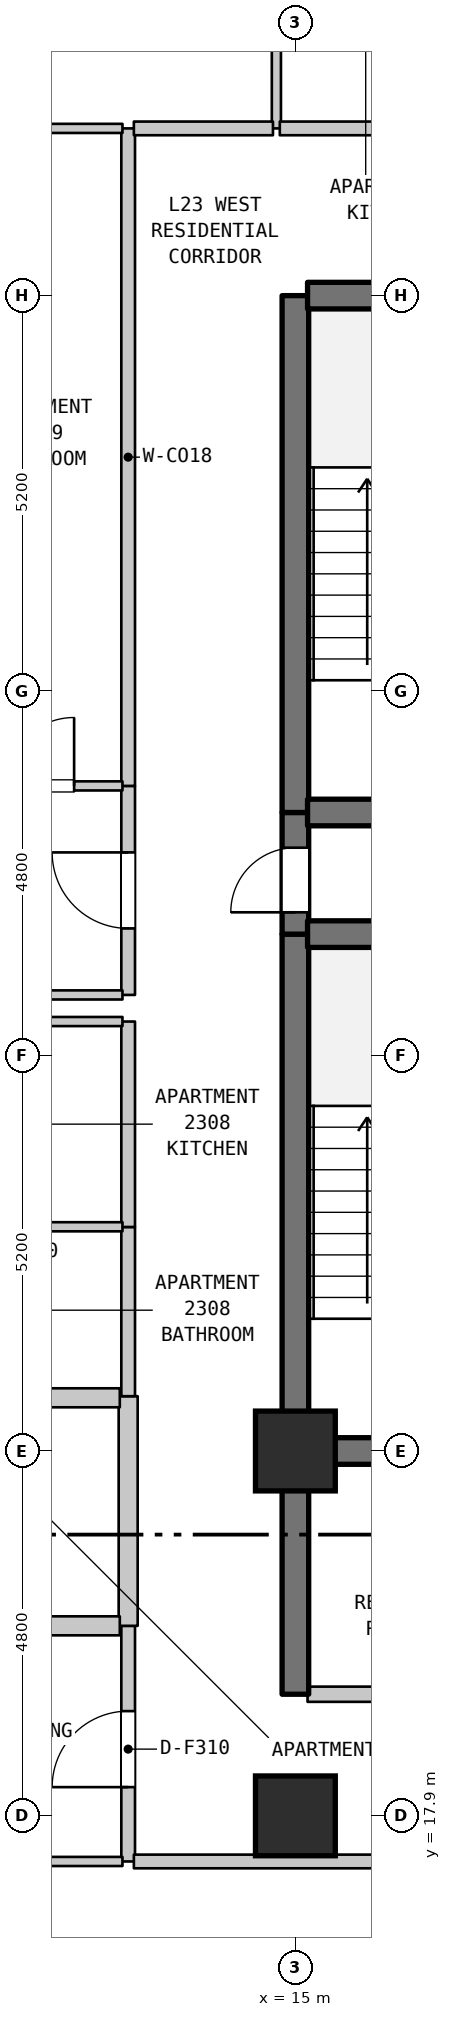
"""IFC4 building model, lengths in metres.
Left out: names, types, materials, properties, quantities, classifications, styles, units other than length and angle.
Written with IfcOpenShell. Run it as: python <this file> out.ifc"""

import sys

from ifc_helpers import new_model, si_unit, direction, frame, frame_2d, origin, origin_2d, place, context, subcontext, project, spatial, rectangle, extrude, element, fill, save


model = new_model("IFC4")
c1 = context("Model", 3, precision=1e-05, world=origin(), true_north=direction((0.0, 1.0)))
c2 = subcontext(c1, "Body", "Model", "MODEL_VIEW")
j1 = project(units=[si_unit("LENGTHUNIT", "METRE"), si_unit("PLANEANGLEUNIT", "RADIAN")], contexts=[c1])
p1 = place(None, origin())
s1 = spatial("IfcSite", under=j1, at=p1, CompositionType="ELEMENT")
p2 = place(p1, origin())
s2 = spatial("IfcBuilding", under=s1, at=p2, CompositionType="ELEMENT")
p3 = place(p2, frame((0.0, 0.0, 98.3)))
s3 = spatial("IfcBuildingStorey", under=s2, at=p3, CompositionType="ELEMENT", Elevation=98.3)
for number, where, z_axis, x_axis in (
    (1, (15.0, 17.9, 0.0), (0.0, 0.0, 1.0), (1.0, 0.0, 0.0)),
    (2, (15.0, 22.7, 0.0), (0.0, 0.0, 1.0), (1.0, 0.0, 0.0)),
):
    element("IfcColumn", number, at=place(p3, frame(where, z_axis=z_axis, x_axis=x_axis)), inside=s3, PredefinedType="COLUMN", context=c2, shape_type="SweptSolid", body=[
        extrude(rectangle(XDim=1.05, YDim=1.05, at=origin_2d()), origin(), (0.0, 0.0, 1.0), 3.7),
    ])
p4 = place(p3, frame((12.8, 17.3, 0.0), z_axis=(0.0, 0.0, 1.0), x_axis=(0.0, 1.0, 0.0)))
e3 = element("IfcWall", 3, at=p4, inside=s3, PredefinedType="STANDARD", context=c2, shape_type="SweptSolid", body=[
    extrude(rectangle(XDim=3.1, YDim=0.18, at=frame_2d((1.55, 0.0))), origin(), (0.0, 0.0, 1.0), 3.385),
])
p5 = place(p4, frame((0.978, 0.0, 0.0)))
e4 = element("IfcOpeningElement", 4, at=p5, cuts=e3, PredefinedType="OPENING", context=c2, shape_type="SweptSolid", body=[
    extrude(rectangle(XDim=1.0, YDim=2.15, at=frame_2d((0.5, 1.075))), frame((0.0, 0.1, 0.0), z_axis=(0.0, -1.0, 0.0), x_axis=(1.0, 0.0, 0.0)), (0.0, 0.0, 1.0), 0.2),
])
p6 = place(p3, frame((12.8, 20.4, 0.0), z_axis=(0.0, 0.0, 1.0), x_axis=(0.0, 1.0, 0.0)))
e5 = element("IfcWall", 5, at=p6, inside=s3, PredefinedType="STANDARD", context=c2, shape_type="SweptSolid", body=[
    extrude(rectangle(XDim=3.021, YDim=0.25, at=frame_2d((1.51, 0.0))), origin(), (0.0, 0.0, 1.0), 3.385),
])
p7 = place(p3, frame((12.8, 23.421, 0.0), z_axis=(0.0, 0.0, 1.0), x_axis=(0.0, 1.0, 0.0)))
e6 = element("IfcWall", 6, at=p7, inside=s3, PredefinedType="STANDARD", context=c2, shape_type="SweptSolid", body=[
    extrude(rectangle(XDim=2.226, YDim=0.18, at=frame_2d((1.113, 0.0))), origin(), (0.0, 0.0, 1.0), 3.385),
])
p8 = place(p3, frame((12.8, 25.647, 0.0), z_axis=(0.0, 0.0, 1.0), x_axis=(0.0, 1.0, 0.0)))
e7 = element("IfcWall", 7, at=p8, inside=s3, PredefinedType="STANDARD", context=c2, shape_type="SweptSolid", body=[
    extrude(rectangle(XDim=2.703, YDim=0.18, at=frame_2d((1.352, 0.0))), origin(), (0.0, 0.0, 1.0), 3.385),
])
p9 = place(p3, frame((12.8, 28.7, 0.0), z_axis=(0.0, 0.0, 1.0), x_axis=(0.0, 1.0, 0.0)))
e8 = element("IfcWall", 8, at=p9, inside=s3, PredefinedType="STANDARD", context=c2, shape_type="SweptSolid", body=[
    extrude(rectangle(XDim=2.75, YDim=0.18, at=frame_2d((1.375, 0.0))), origin(), (0.0, 0.0, 1.0), 3.385),
])
p10 = place(p9, frame((0.875, 0.0, 0.0)))
e9 = element("IfcOpeningElement", 9, at=p10, cuts=e8, PredefinedType="OPENING", context=c2, shape_type="SweptSolid", body=[
    extrude(rectangle(XDim=1.0, YDim=2.15, at=frame_2d((0.5, 1.075))), frame((0.0, 0.1, 0.0), z_axis=(0.0, -1.0, 0.0), x_axis=(1.0, 0.0, 0.0)), (0.0, 0.0, 1.0), 0.2),
])
p11 = place(p3, frame((12.8, 31.45, 0.0), z_axis=(0.0, 0.0, 1.0), x_axis=(0.0, 1.0, 0.0)))
e10 = element("IfcWall", 10, at=p11, inside=s3, PredefinedType="STANDARD", context=c2, shape_type="SweptSolid", body=[
    extrude(rectangle(XDim=8.65, YDim=0.18, at=frame_2d((4.325, 0.0))), origin(), (0.0, 0.0, 1.0), 3.385),
])
p12 = place(p3, frame((14.75, 40.1, 0.0), z_axis=(0.0, 0.0, 1.0), x_axis=(0.0, 1.0, 0.0)))
e11 = element("IfcWall", 11, at=p12, inside=s3, PredefinedType="PARTITIONING", context=c2, shape_type="SweptSolid", body=[
    extrude(rectangle(XDim=3.2, YDim=0.12, at=frame_2d((1.6, 0.0))), origin(), (0.0, 0.0, 1.0), 3.385),
])
p13 = place(p12, frame((1.15, 0.0, 0.0)))
e12 = element("IfcOpeningElement", 12, at=p13, cuts=e11, PredefinedType="OPENING", context=c2, shape_type="SweptSolid", body=[
    extrude(rectangle(XDim=0.9, YDim=2.15, at=frame_2d((0.45, 1.075))), frame((0.0, 0.07, 0.0), z_axis=(0.0, -1.0, 0.0), x_axis=(1.0, 0.0, 0.0)), (0.0, 0.0, 1.0), 0.14),
])
p14 = place(p3, frame((15.0, 19.5, 0.0), z_axis=(0.0, 0.0, 1.0), x_axis=(0.0, 1.0, 0.0)))
e13 = element("IfcWall", 13, at=p14, inside=s3, PredefinedType="SHEAR", context=c2, shape_type="SweptSolid", body=[
    extrude(rectangle(XDim=3.2, YDim=0.35, at=frame_2d((1.6, 0.0))), origin(), (0.0, 0.0, 1.0), 3.385),
])
p15 = place(p3, frame((15.0, 22.7, 0.0), z_axis=(0.0, 0.0, 1.0), x_axis=(0.0, 1.0, 0.0)))
e14 = element("IfcWall", 14, at=p15, inside=s3, PredefinedType="SHEAR", context=c2, shape_type="SweptSolid", body=[
    extrude(rectangle(XDim=6.8, YDim=0.35, at=frame_2d((3.4, 0.0))), origin(), (0.0, 0.0, 1.0), 3.385),
])
p16 = place(p3, frame((15.0, 29.5, 0.0), z_axis=(0.0, 0.0, 1.0), x_axis=(0.0, 1.0, 0.0)))
e15 = element("IfcWall", 15, at=p16, inside=s3, PredefinedType="SHEAR", context=c2, shape_type="SweptSolid", body=[
    extrude(rectangle(XDim=1.6, YDim=0.35, at=frame_2d((0.8, 0.0))), origin(), (0.0, 0.0, 1.0), 3.385),
])
p17 = place(p16, frame((0.287, 0.0, 0.0)))
e16 = element("IfcOpeningElement", 16, at=p17, cuts=e15, PredefinedType="OPENING", context=c2, shape_type="SweptSolid", body=[
    extrude(rectangle(XDim=0.85, YDim=2.1, at=frame_2d((0.425, 1.05))), frame((0.0, 0.185, 0.0), z_axis=(0.0, -1.0, 0.0), x_axis=(1.0, 0.0, 0.0)), (0.0, 0.0, 1.0), 0.37),
])
p18 = place(p3, frame((15.0, 31.1, 0.0), z_axis=(0.0, 0.0, 1.0), x_axis=(0.0, 1.0, 0.0)))
e17 = element("IfcWall", 17, at=p18, inside=s3, PredefinedType="SHEAR", context=c2, shape_type="SweptSolid", body=[
    extrude(rectangle(XDim=6.8, YDim=0.35, at=frame_2d((3.4, 0.0))), origin(), (0.0, 0.0, 1.0), 3.385),
])
p19 = place(p3, frame((9.085, 17.3, 0.0), z_axis=(0.0, 0.0, 1.0), x_axis=(1.0, 0.0, 0.0)))
e18 = element("IfcWall", 18, at=p19, inside=s3, PredefinedType="PARTITIONING", context=c2, shape_type="SweptSolid", body=[
    extrude(rectangle(XDim=3.64, YDim=0.12, at=frame_2d((1.82, 0.0))), origin(), (0.0, 0.0, 1.0), 3.385),
])
p20 = place(p3, frame((12.875, 17.3, 0.0), z_axis=(0.0, 0.0, 1.0), x_axis=(1.0, 0.0, 0.0)))
e19 = element("IfcWall", 19, at=p20, inside=s3, PredefinedType="STANDARD", context=c2, shape_type="SweptSolid", body=[
    extrude(rectangle(XDim=7.35, YDim=0.18, at=frame_2d((3.675, 0.0))), origin(), (0.0, 0.0, 1.0), 3.385),
])
p21 = place(p20, frame((3.16, 0.0, 0.0)))
e20 = element("IfcOpeningElement", 20, at=p21, cuts=e19, PredefinedType="OPENING", context=c2, shape_type="SweptSolid", body=[
    extrude(rectangle(XDim=1.0, YDim=2.15, at=frame_2d((0.5, 1.075))), frame((0.0, 0.1, 0.0), z_axis=(0.0, -1.0, 0.0), x_axis=(1.0, 0.0, 0.0)), (0.0, 0.0, 1.0), 0.2),
])
p22 = place(p3, frame((15.16, 19.5, 0.0), z_axis=(0.0, 0.0, 1.0), x_axis=(1.0, 0.0, 0.0)))
e21 = element("IfcWall", 21, at=p22, inside=s3, PredefinedType="STANDARD", context=c2, shape_type="SweptSolid", body=[
    extrude(rectangle(XDim=3.68, YDim=0.2, at=frame_2d((1.84, 0.0))), origin(), (0.0, 0.0, 1.0), 3.385),
])
p23 = place(p22, frame((1.39, 0.0, 0.0)))
e22 = element("IfcOpeningElement", 22, at=p23, cuts=e21, PredefinedType="OPENING", context=c2, shape_type="SweptSolid", body=[
    extrude(rectangle(XDim=0.9, YDim=2.15, at=frame_2d((0.45, 1.075))), frame((0.0, 0.11, 0.0), z_axis=(0.0, -1.0, 0.0), x_axis=(1.0, 0.0, 0.0)), (0.0, 0.0, 1.0), 0.22),
])
p24 = place(p3, frame((10.66, 20.4, 0.0), z_axis=(0.0, 0.0, 1.0), x_axis=(1.0, 0.0, 0.0)))
e23 = element("IfcWall", 23, at=p24, inside=s3, PredefinedType="STANDARD", context=c2, shape_type="SweptSolid", body=[
    extrude(rectangle(XDim=2.03, YDim=0.25, at=frame_2d((1.015, 0.0))), origin(), (0.0, 0.0, 1.0), 3.385),
])
p25 = place(p3, frame((15.16, 22.7, 0.0), z_axis=(0.0, 0.0, 1.0), x_axis=(1.0, 0.0, 0.0)))
e24 = element("IfcWall", 24, at=p25, inside=s3, PredefinedType="SHEAR", context=c2, shape_type="SweptSolid", body=[
    extrude(rectangle(XDim=3.68, YDim=0.35, at=frame_2d((1.84, 0.0))), origin(), (0.0, 0.0, 1.0), 3.385),
])
p26 = place(p3, frame((10.66, 23.4, 0.0), z_axis=(0.0, 0.0, 1.0), x_axis=(1.0, 0.0, 0.0)))
e25 = element("IfcWall", 25, at=p26, inside=s3, PredefinedType="STANDARD", context=c2, shape_type="SweptSolid", body=[
    extrude(rectangle(XDim=2.03, YDim=0.25, at=frame_2d((1.015, 0.0))), origin(), (0.0, 0.0, 1.0), 3.385),
])
for number, where, z_axis, x_axis in (
    (26, (10.595, 25.65, 0.0), (0.0, 0.0, 1.0), (1.0, 0.0, 0.0)),
    (27, (10.595, 28.35, 0.0), (0.0, 0.0, 1.0), (1.0, 0.0, 0.0)),
):
    element("IfcWall", number, at=place(p3, frame(where, z_axis=z_axis, x_axis=x_axis)), inside=s3, PredefinedType="PARTITIONING", context=c2, shape_type="SweptSolid", body=[
        extrude(rectangle(XDim=2.13, YDim=0.12, at=frame_2d((1.065, 0.0))), origin(), (0.0, 0.0, 1.0), 3.385),
    ])
p27 = place(p3, frame((9.03, 28.7, 0.0), z_axis=(0.0, 0.0, 1.0), x_axis=(1.0, 0.0, 0.0)))
e28 = element("IfcWall", 28, at=p27, inside=s3, PredefinedType="PARTITIONING", context=c2, shape_type="SweptSolid", body=[
    extrude(rectangle(XDim=3.695, YDim=0.12, at=frame_2d((1.848, 0.0))), origin(), (0.0, 0.0, 1.0), 3.385),
])
for number, where, z_axis, x_axis in (
    (29, (15.16, 29.5, 0.0), (0.0, 0.0, 1.0), (1.0, 0.0, 0.0)),
    (30, (15.16, 31.1, 0.0), (0.0, 0.0, 1.0), (1.0, 0.0, 0.0)),
):
    element("IfcWall", number, at=place(p3, frame(where, z_axis=z_axis, x_axis=x_axis)), inside=s3, PredefinedType="SHEAR", context=c2, shape_type="SweptSolid", body=[
        extrude(rectangle(XDim=3.68, YDim=0.35, at=frame_2d((1.84, 0.0))), origin(), (0.0, 0.0, 1.0), 3.385),
    ])
p28 = place(p3, frame((10.523, 31.45, 0.0), z_axis=(0.0, 0.0, 1.0), x_axis=(1.0, 0.0, 0.0)))
e31 = element("IfcWall", 31, at=p28, inside=s3, PredefinedType="PARTITIONING", context=c2, shape_type="SweptSolid", body=[
    extrude(rectangle(XDim=2.202, YDim=0.12, at=frame_2d((1.101, 0.0))), origin(), (0.0, 0.0, 1.0), 3.385),
])
p29 = place(p28, frame((0.666, 0.0, 0.0)))
e32 = element("IfcOpeningElement", 32, at=p29, cuts=e31, PredefinedType="OPENING", context=c2, shape_type="SweptSolid", body=[
    extrude(rectangle(XDim=0.9, YDim=2.1, at=frame_2d((0.45, 1.05))), frame((0.0, 0.07, 0.0), z_axis=(0.0, -1.0, 0.0), x_axis=(1.0, 0.0, 0.0)), (0.0, 0.0, 1.0), 0.14),
])
p30 = place(p3, frame((15.16, 37.9, 0.0), z_axis=(0.0, 0.0, 1.0), x_axis=(1.0, 0.0, 0.0)))
e33 = element("IfcWall", 33, at=p30, inside=s3, PredefinedType="SHEAR", context=c2, shape_type="SweptSolid", body=[
    extrude(rectangle(XDim=3.68, YDim=0.35, at=frame_2d((1.84, 0.0))), origin(), (0.0, 0.0, 1.0), 3.385),
])
p31 = place(p3, frame((10.523, 40.1, 0.0), z_axis=(0.0, 0.0, 1.0), x_axis=(1.0, 0.0, 0.0)))
e34 = element("IfcWall", 34, at=p31, inside=s3, PredefinedType="PARTITIONING", context=c2, shape_type="SweptSolid", body=[
    extrude(rectangle(XDim=2.202, YDim=0.12, at=frame_2d((1.101, 0.0))), origin(), (0.0, 0.0, 1.0), 3.385),
])
p32 = place(p3, frame((12.875, 40.1, 0.0), z_axis=(0.0, 0.0, 1.0), x_axis=(1.0, 0.0, 0.0)))
e35 = element("IfcWall", 35, at=p32, inside=s3, PredefinedType="STANDARD", context=c2, shape_type="SweptSolid", body=[
    extrude(rectangle(XDim=1.83, YDim=0.18, at=frame_2d((0.915, 0.0))), origin(), (0.0, 0.0, 1.0), 3.385),
])
p33 = place(p3, frame((14.795, 40.1, 0.0), z_axis=(0.0, 0.0, 1.0), x_axis=(1.0, 0.0, 0.0)))
e36 = element("IfcWall", 36, at=p33, inside=s3, PredefinedType="STANDARD", context=c2, shape_type="SweptSolid", body=[
    extrude(rectangle(XDim=2.26, YDim=0.18, at=frame_2d((1.13, 0.0))), origin(), (0.0, 0.0, 1.0), 3.385),
])
p34 = place(p5, origin())
e37 = element("IfcDoor", 37, at=p34, inside=s3, OperationType="SINGLE_SWING_LEFT", PredefinedType="DOOR", context=c2, shape_type="SweptSolid", body=[
    extrude(rectangle(XDim=1.0, YDim=2.15, at=frame_2d((0.5, 1.075))), frame((0.0, 0.025, 0.0), z_axis=(0.0, -1.0, 0.0), x_axis=(1.0, 0.0, 0.0)), (0.0, 0.0, 1.0), 0.05),
])
fill(e4, e37)
p35 = place(p10, origin())
e38 = element("IfcDoor", 38, at=p35, inside=s3, OperationType="SINGLE_SWING_RIGHT", PredefinedType="DOOR", context=c2, shape_type="SweptSolid", body=[
    extrude(rectangle(XDim=1.0, YDim=2.15, at=frame_2d((0.5, 1.075))), frame((0.0, 0.025, 0.0), z_axis=(0.0, -1.0, 0.0), x_axis=(1.0, 0.0, 0.0)), (0.0, 0.0, 1.0), 0.05),
])
fill(e9, e38)
p36 = place(p17, origin())
e39 = element("IfcDoor", 39, at=p36, inside=s3, OperationType="SINGLE_SWING_LEFT", PredefinedType="DOOR", context=c2, shape_type="SweptSolid", body=[
    extrude(rectangle(XDim=0.85, YDim=2.1, at=frame_2d((0.425, 1.05))), frame((0.0, 0.025, 0.0), z_axis=(0.0, -1.0, 0.0), x_axis=(1.0, 0.0, 0.0)), (0.0, 0.0, 1.0), 0.05),
])
fill(e16, e39)
p37 = place(p29, origin())
e40 = element("IfcDoor", 40, at=p37, inside=s3, OperationType="SINGLE_SWING_RIGHT", PredefinedType="DOOR", context=c2, shape_type="SweptSolid", body=[
    extrude(rectangle(XDim=0.9, YDim=2.1, at=frame_2d((0.45, 1.05))), frame((0.0, 0.025, 0.0), z_axis=(0.0, -1.0, 0.0), x_axis=(1.0, 0.0, 0.0)), (0.0, 0.0, 1.0), 0.05),
])
fill(e32, e40)
save(model, sys.argv[1])
